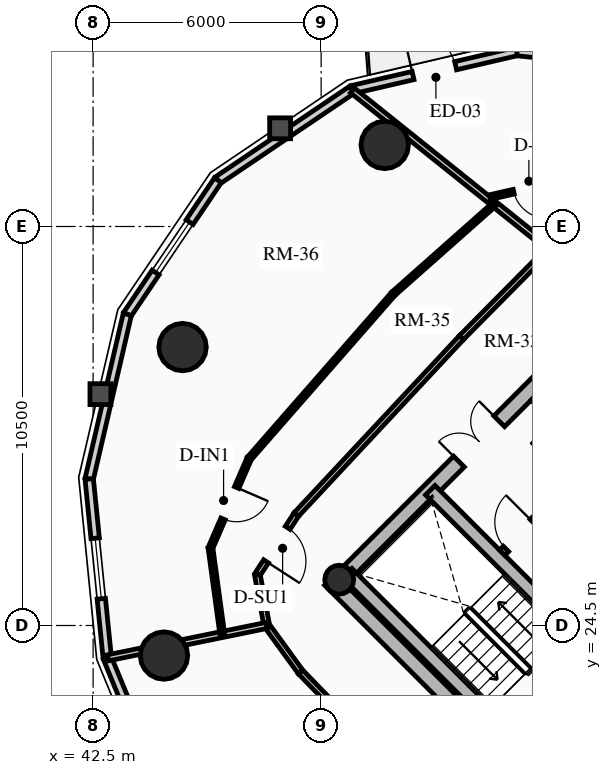
"""IFC4 building model, lengths in metres.
Left out: names, types, materials, properties, quantities, classifications, styles, units other than length and angle.
Written with IfcOpenShell. Run it as: python <this file> out.ifc"""

import sys

from ifc_helpers import new_model, si_unit, direction, frame, frame_2d, origin, origin_2d, place, context, subcontext, project, spatial, rectangle, circle, hollow_circle, extrude, source, transform, mapped, element, fill, save


model = new_model("IFC4")
c1 = context("Model", 3, precision=1e-05, world=origin(), true_north=direction((0.0, 1.0)))
c2 = subcontext(c1, "Body", "Model", "MODEL_VIEW")
j1 = project(units=[si_unit("LENGTHUNIT", "METRE"), si_unit("PLANEANGLEUNIT", "RADIAN")], contexts=[c1])
p1 = place(None, origin())
s1 = spatial("IfcSite", under=j1, at=p1, CompositionType="ELEMENT")
p2 = place(p1, origin())
s2 = spatial("IfcBuilding", under=s1, at=p2, CompositionType="ELEMENT")
p3 = place(p2, frame((0.0, 0.0, 171.97)))
s3 = spatial("IfcBuildingStorey", under=s2, at=p3, CompositionType="ELEMENT", Elevation=171.97)
p4 = place(p3, frame((58.702, 15.732, 0.0), z_axis=(0.0, 0.0, 1.0), x_axis=(-0.707106781187, 0.707106781187, 0.0)))
e1 = element("IfcWall", 1, at=p4, inside=s3, PredefinedType="SHEAR", context=c2, shape_type="SweptSolid", body=[
    extrude(rectangle(XDim=14.1, YDim=0.4, at=frame_2d((7.05, 0.0))), origin(), (0.0, 0.0, 1.0), 2.91),
])
p5 = place(p3, frame((48.873, 25.561, 0.0), z_axis=(0.0, 0.0, 1.0), x_axis=(0.707106781187, 0.707106781187, 0.0)))
e2 = element("IfcWall", 2, at=p5, inside=s3, PredefinedType="SHEAR", context=c2, shape_type="SweptSolid", body=[
    extrude(rectangle(XDim=10.7, YDim=0.4, at=frame_2d((5.35, 0.0))), origin(), (0.0, 0.0, 1.0), 2.91),
])
m1 = source(origin(), c2, "Body", "SweptSolid", [
    extrude(rectangle(XDim=1.5, YDim=2.02, at=frame_2d((0.75, 1.01))), frame((0.0, 0.21, 0.0), z_axis=(0.0, -1.0, 0.0), x_axis=(1.0, 0.0, 0.0)), (0.0, 0.0, 1.0), 0.42),
])
p6 = place(p5, frame((4.6, 0.0, 0.0)))
e3 = element("IfcOpeningElement", 3, at=p6, cuts=e2, PredefinedType="OPENING", context=c2, shape_type="MappedRepresentation", body=[
    mapped(m1, transform((0.0, 0.0, 0.0), x_axis=(1.0, 0.0, 0.0), y_axis=(0.0, 1.0, 0.0), z_axis=(0.0, 0.0, 1.0), scale=1.0)),
])
p7 = place(p3, frame((61.06, 18.373, 0.0), z_axis=(0.0, 0.0, 1.0), x_axis=(-0.707106781187, 0.707106781187, 0.0)))
e4 = element("IfcWall", 4, at=p7, inside=s3, PredefinedType="SHEAR", context=c2, shape_type="SweptSolid", body=[
    extrude(rectangle(XDim=13.7, YDim=0.35, at=frame_2d((6.85, 0.0))), origin(), (0.0, 0.0, 1.0), 2.91),
])
m2 = source(origin(), c2, "Body", "SweptSolid", [
    extrude(rectangle(XDim=1.1, YDim=2.015, at=frame_2d((0.55, 1.007))), frame((0.0, 0.185, 0.0), z_axis=(0.0, -1.0, 0.0), x_axis=(1.0, 0.0, 0.0)), (0.0, 0.0, 1.0), 0.37),
])
p8 = place(p7, frame((4.85, 0.0, 0.0)))
e5 = element("IfcOpeningElement", 5, at=p8, cuts=e4, PredefinedType="OPENING", context=c2, shape_type="MappedRepresentation", body=[
    mapped(m2, transform((0.0, 0.0, 0.0), x_axis=(1.0, 0.0, 0.0), y_axis=(0.0, 1.0, 0.0), z_axis=(0.0, 0.0, 1.0), scale=1.0)),
])
p9 = place(p7, frame((0.625, 0.0, 0.0)))
e6 = element("IfcOpeningElement", 6, at=p9, cuts=e4, PredefinedType="OPENING", context=c2, shape_type="MappedRepresentation", body=[
    mapped(m2, transform((0.0, 0.0, 0.0), x_axis=(1.0, 0.0, 0.0), y_axis=(0.0, 1.0, 0.0), z_axis=(0.0, 0.0, 1.0), scale=1.0)),
])
p10 = place(p7, frame((2.625, 0.0, 0.0)))
e7 = element("IfcOpeningElement", 7, at=p10, cuts=e4, PredefinedType="OPENING", context=c2, shape_type="MappedRepresentation", body=[
    mapped(m2, transform((0.0, 0.0, 0.0), x_axis=(1.0, 0.0, 0.0), y_axis=(0.0, 1.0, 0.0), z_axis=(0.0, 0.0, 1.0), scale=1.0)),
])
m3 = source(origin(), c2, "Body", "SweptSolid", [
    extrude(rectangle(XDim=1.15, YDim=2.02, at=frame_2d((0.575, 1.01))), frame((0.0, 0.185, 0.0), z_axis=(0.0, -1.0, 0.0), x_axis=(1.0, 0.0, 0.0)), (0.0, 0.0, 1.0), 0.37),
])
p11 = place(p7, frame((7.27, 0.0, 0.0)))
e8 = element("IfcOpeningElement", 8, at=p11, cuts=e4, PredefinedType="OPENING", context=c2, shape_type="MappedRepresentation", body=[
    mapped(m3, transform((0.0, 0.0, 0.0), x_axis=(1.0, 0.0, 0.0), y_axis=(0.0, 1.0, 0.0), z_axis=(0.0, 0.0, 1.0), scale=1.0)),
])
p12 = place(p3, frame((53.922, 21.141, 0.0), z_axis=(0.0, 0.0, 1.0), x_axis=(-0.707106781187, 0.707106781187, 0.0)))
e9 = element("IfcWall", 9, at=p12, inside=s3, PredefinedType="SHEAR", context=c2, shape_type="SweptSolid", body=[
    extrude(rectangle(XDim=6.695, YDim=0.35, at=frame_2d((3.348, 0.0))), origin(), (0.0, 0.0, 1.0), 2.91),
])
p13 = place(p3, frame((53.784, 21.003, 0.0), z_axis=(0.0, 0.0, 1.0), x_axis=(0.707106781187, 0.707106781187, 0.0)))
e10 = element("IfcWall", 10, at=p13, inside=s3, PredefinedType="SHEAR", context=c2, shape_type="SweptSolid", body=[
    extrude(rectangle(XDim=3.285, YDim=0.35, at=frame_2d((1.643, 0.0))), origin(), (0.0, 0.0, 1.0), 2.91),
])
p14 = place(p3, frame((48.976, 25.706, 0.0), z_axis=(0.0, 0.0, 1.0), x_axis=(0.707106781187, 0.707106781187, 0.0)))
e11 = element("IfcColumn", 11, at=p14, inside=s3, PredefinedType="COLUMN", context=c2, shape_type="SweptSolid", body=[
    extrude(hollow_circle(Radius=0.38, WallThickness=0.032, at=origin_2d()), origin(), (0.0, 0.0, 1.0), 2.91),
])
for number, where, z_axis, x_axis in (
    (12, (50.173, 37.146, 0.0), (0.0, 0.0, 1.0), (1.0, 0.0, 0.0)),
    (13, (44.854, 31.827, 0.0), (0.0, 0.0, 1.0), (1.0, 0.0, 0.0)),
    (14, (44.365, 23.709, 0.0), (0.0, 0.0, 1.0), (1.0, 0.0, 0.0)),
):
    element("IfcColumn", number, at=place(p3, frame(where, z_axis=z_axis, x_axis=x_axis)), inside=s3, PredefinedType="USERDEFINED", context=c2, shape_type="SweptSolid", body=[
        extrude(circle(Radius=0.625, at=origin_2d()), origin(), (0.0, 0.0, 1.0), 2.91),
    ])
p15 = place(p3, frame((53.645, 39.603, 0.0), z_axis=(0.0, 0.0, 1.0), x_axis=(0.994943283129, -0.100438356004, 0.0)))
e15 = element("IfcWall", 15, at=p15, inside=s3, PredefinedType="SOLIDWALL", context=c2, shape_type="SweptSolid", body=[
    extrude(rectangle(XDim=4.733, YDim=0.22, at=frame_2d((2.366, 0.0))), origin(), (0.0, 0.0, 1.0), 2.245),
])
m4 = source(origin(), c2, "Body", "SweptSolid", [
    extrude(rectangle(XDim=1.6, YDim=1.3, at=frame_2d((0.8, 0.65))), frame((0.0, 0.12, 0.0), z_axis=(0.0, -1.0, 0.0), x_axis=(1.0, 0.0, 0.0)), (0.0, 0.0, 1.0), 0.24),
])
p16 = place(p15, frame((1.566, 0.0, 0.65)))
e16 = element("IfcOpeningElement", 16, at=p16, cuts=e15, PredefinedType="OPENING", context=c2, shape_type="MappedRepresentation", body=[
    mapped(m4, transform((0.0, 0.0, 0.0), x_axis=(1.0, 0.0, 0.0), y_axis=(0.0, 1.0, 0.0), z_axis=(0.0, 0.0, 1.0), scale=1.0)),
])
p17 = place(p3, frame((49.313, 38.6, 0.0), z_axis=(0.0, 0.0, 1.0), x_axis=(0.97422620202, 0.22557328587, 0.0)))
e17 = element("IfcWall", 17, at=p17, inside=s3, PredefinedType="SOLIDWALL", context=c2, shape_type="SweptSolid", body=[
    extrude(rectangle(XDim=4.446, YDim=0.22, at=frame_2d((2.223, 0.0))), origin(), (0.0, 0.0, 1.0), 2.245),
])
m5 = source(origin(), c2, "Body", "SweptSolid", [
    extrude(rectangle(XDim=1.15, YDim=2.005, at=frame_2d((0.575, 1.002))), frame((0.0, 0.12, 0.0), z_axis=(0.0, -1.0, 0.0), x_axis=(1.0, 0.0, 0.0)), (0.0, 0.0, 1.0), 0.24),
])
p18 = place(p17, frame((1.648, 0.0, 0.0)))
e18 = element("IfcOpeningElement", 18, at=p18, cuts=e17, PredefinedType="OPENING", context=c2, shape_type="MappedRepresentation", body=[
    mapped(m5, transform((0.0, 0.0, 0.0), x_axis=(1.0, 0.0, 0.0), y_axis=(0.0, 1.0, 0.0), z_axis=(0.0, 0.0, 1.0), scale=1.0)),
])
p19 = place(p3, frame((45.783, 36.217, 0.0), z_axis=(0.0, 0.0, 1.0), x_axis=(0.828817439852, 0.55951912514, 0.0)))
e19 = element("IfcWall", 19, at=p19, inside=s3, PredefinedType="SOLIDWALL", context=c2, shape_type="SweptSolid", body=[
    extrude(rectangle(XDim=4.259, YDim=0.22, at=frame_2d((2.129, 0.0))), origin(), (0.0, 0.0, 1.0), 2.245),
])
p20 = place(p3, frame((43.4, 32.687, 0.0), z_axis=(0.0, 0.0, 1.0), x_axis=(0.55951912514, 0.828817439852, 0.0)))
e20 = element("IfcWall", 20, at=p20, inside=s3, PredefinedType="SOLIDWALL", context=c2, shape_type="SweptSolid", body=[
    extrude(rectangle(XDim=4.259, YDim=0.22, at=frame_2d((2.129, 0.0))), origin(), (0.0, 0.0, 1.0), 2.245),
])
p21 = place(p20, frame((1.33, 0.0, 0.65)))
e21 = element("IfcOpeningElement", 21, at=p21, cuts=e20, PredefinedType="OPENING", context=c2, shape_type="MappedRepresentation", body=[
    mapped(m4, transform((0.0, 0.0, 0.0), x_axis=(1.0, 0.0, 0.0), y_axis=(0.0, 1.0, 0.0), z_axis=(0.0, 0.0, 1.0), scale=1.0)),
])
p22 = place(p3, frame((42.397, 28.355, 0.0), z_axis=(0.0, 0.0, 1.0), x_axis=(0.22557328587, 0.97422620202, 0.0)))
e22 = element("IfcWall", 22, at=p22, inside=s3, PredefinedType="SOLIDWALL", context=c2, shape_type="SweptSolid", body=[
    extrude(rectangle(XDim=4.446, YDim=0.22, at=frame_2d((2.223, 0.0))), origin(), (0.0, 0.0, 1.0), 2.245),
])
p23 = place(p3, frame((42.873, 23.646, 0.0), z_axis=(0.0, 0.0, 1.0), x_axis=(-0.100438356004, 0.994943283129, 0.0)))
e23 = element("IfcWall", 23, at=p23, inside=s3, PredefinedType="SOLIDWALL", context=c2, shape_type="SweptSolid", body=[
    extrude(rectangle(XDim=4.733, YDim=0.22, at=frame_2d((2.366, 0.0))), origin(), (0.0, 0.0, 1.0), 2.245),
])
p24 = place(p23, frame((1.566, 0.0, 0.65)))
e24 = element("IfcOpeningElement", 24, at=p24, cuts=e23, PredefinedType="OPENING", context=c2, shape_type="MappedRepresentation", body=[
    mapped(m4, transform((0.0, 0.0, 0.0), x_axis=(1.0, 0.0, 0.0), y_axis=(0.0, 1.0, 0.0), z_axis=(0.0, 0.0, 1.0), scale=1.0)),
])
p25 = place(p3, frame((44.78, 19.021, 0.0), z_axis=(0.0, 0.0, 1.0), x_axis=(-0.381196434348, 0.924494066201, 0.0)))
e25 = element("IfcWall", 25, at=p25, inside=s3, PredefinedType="SOLIDWALL", context=c2, shape_type="SweptSolid", body=[
    extrude(rectangle(XDim=5.003, YDim=0.22, at=frame_2d((2.501, 0.0))), origin(), (0.0, 0.0, 1.0), 2.245),
])
p26 = place(p25, frame((1.702, 0.0, 0.65)))
e26 = element("IfcOpeningElement", 26, at=p26, cuts=e25, PredefinedType="OPENING", context=c2, shape_type="MappedRepresentation", body=[
    mapped(m4, transform((0.0, 0.0, 0.0), x_axis=(1.0, 0.0, 0.0), y_axis=(0.0, 1.0, 0.0), z_axis=(0.0, 0.0, 1.0), scale=1.0)),
])
p27 = place(p3, frame((53.264, 26.416, 0.0), z_axis=(0.0, 0.0, 1.0), x_axis=(0.707106781187, 0.707106781187, 0.0)))
e27 = element("IfcWall", 27, at=p27, inside=s3, PredefinedType="PARTITIONING", context=c2, shape_type="SweptSolid", body=[
    extrude(rectangle(XDim=3.28, YDim=0.2, at=frame_2d((1.64, 0.0))), origin(), (0.0, 0.0, 1.0), 2.675),
])
m6 = source(origin(), c2, "Body", "SweptSolid", [
    extrude(rectangle(XDim=1.0, YDim=2.015, at=frame_2d((0.5, 1.007))), frame((0.0, 0.11, 0.0), z_axis=(0.0, -1.0, 0.0), x_axis=(1.0, 0.0, 0.0)), (0.0, 0.0, 1.0), 0.22),
])
p28 = place(p27, frame((0.14, 0.0, 0.0)))
e28 = element("IfcOpeningElement", 28, at=p28, cuts=e27, PredefinedType="OPENING", context=c2, shape_type="MappedRepresentation", body=[
    mapped(m6, transform((0.0, 0.0, 0.0), x_axis=(1.0, 0.0, 0.0), y_axis=(0.0, 1.0, 0.0), z_axis=(0.0, 0.0, 1.0), scale=1.0)),
])
m7 = source(origin(), c2, "Body", "SweptSolid", [
    extrude(rectangle(XDim=0.9, YDim=2.005, at=frame_2d((0.45, 1.002))), frame((0.0, 0.11, 0.0), z_axis=(0.0, -1.0, 0.0), x_axis=(1.0, 0.0, 0.0)), (0.0, 0.0, 1.0), 0.22),
])
p29 = place(p27, frame((2.05, 0.0, 0.0)))
e29 = element("IfcOpeningElement", 29, at=p29, cuts=e27, PredefinedType="OPENING", context=c2, shape_type="MappedRepresentation", body=[
    mapped(m7, transform((0.0, 0.0, 0.0), x_axis=(1.0, 0.0, 0.0), y_axis=(0.0, 1.0, 0.0), z_axis=(0.0, 0.0, 1.0), scale=1.0)),
])
p30 = place(p3, frame((56.839, 27.728, 0.0), z_axis=(0.0, 0.0, 1.0), x_axis=(-0.707106781187, 0.707106781187, 0.0)))
e30 = element("IfcWall", 30, at=p30, inside=s3, PredefinedType="PARTITIONING", context=c2, shape_type="SweptSolid", body=[
    extrude(rectangle(XDim=3.9, YDim=0.16, at=frame_2d((1.95, 0.0))), origin(), (0.0, 0.0, 1.0), 2.675),
])
m8 = source(origin(), c2, "Body", "SweptSolid", [
    extrude(rectangle(XDim=0.9, YDim=2.005, at=frame_2d((0.45, 1.002))), frame((0.0, 0.09, 0.0), z_axis=(0.0, -1.0, 0.0), x_axis=(1.0, 0.0, 0.0)), (0.0, 0.0, 1.0), 0.18),
])
p31 = place(p30, frame((2.2, 0.0, 0.0)))
e31 = element("IfcOpeningElement", 31, at=p31, cuts=e30, PredefinedType="OPENING", context=c2, shape_type="MappedRepresentation", body=[
    mapped(m8, transform((0.0, 0.0, 0.0), x_axis=(1.0, 0.0, 0.0), y_axis=(0.0, 1.0, 0.0), z_axis=(0.0, 0.0, 1.0), scale=1.0)),
])
p32 = place(p3, frame((54.514, 34.422, 0.0), z_axis=(0.0, 0.0, 1.0), x_axis=(-0.703289573518, -0.710903492593, 0.0)))
e32 = element("IfcWall", 32, at=p32, inside=s3, PredefinedType="PARTITIONING", context=c2, shape_type="SweptSolid", body=[
    extrude(rectangle(XDim=3.303, YDim=0.15, at=frame_2d((1.651, 0.0))), origin(), (0.0, 0.0, 1.0), 2.245),
])
p33 = place(p3, frame((52.191, 32.074, 0.0), z_axis=(0.0, 0.0, 1.0), x_axis=(-0.682404362608, -0.730974887321, 0.0)))
e33 = element("IfcWall", 33, at=p33, inside=s3, PredefinedType="PARTITIONING", context=c2, shape_type="SweptSolid", body=[
    extrude(rectangle(XDim=6.364, YDim=0.15, at=frame_2d((3.182, 0.0))), origin(), (0.0, 0.0, 1.0), 2.245),
])
p34 = place(p3, frame((47.849, 27.423, 0.0), z_axis=(0.0, 0.0, 1.0), x_axis=(-0.543529808582, -0.839389866023, 0.0)))
e34 = element("IfcWall", 34, at=p34, inside=s3, PredefinedType="PARTITIONING", context=c2, shape_type="SweptSolid", body=[
    extrude(rectangle(XDim=1.89, YDim=0.15, at=frame_2d((0.945, 0.0))), origin(), (0.0, 0.0, 1.0), 2.245),
])
m9 = source(origin(), c2, "Body", "SweptSolid", [
    extrude(rectangle(XDim=1.05, YDim=2.015, at=frame_2d((0.525, 1.007))), frame((0.0, 0.085, 0.0), z_axis=(0.0, -1.0, 0.0), x_axis=(1.0, 0.0, 0.0)), (0.0, 0.0, 1.0), 0.17),
])
p35 = place(p34, frame((0.42, 0.0, 0.0)))
e35 = element("IfcOpeningElement", 35, at=p35, cuts=e34, PredefinedType="OPENING", context=c2, shape_type="MappedRepresentation", body=[
    mapped(m9, transform((0.0, 0.0, 0.0), x_axis=(1.0, 0.0, 0.0), y_axis=(0.0, 1.0, 0.0), z_axis=(0.0, 0.0, 1.0), scale=1.0)),
])
p36 = place(p3, frame((46.822, 25.836, 0.0), z_axis=(0.0, 0.0, 1.0), x_axis=(0.182115036249, -0.983277231289, 0.0)))
e36 = element("IfcWall", 36, at=p36, inside=s3, PredefinedType="PARTITIONING", context=c2, shape_type="SweptSolid", body=[
    extrude(rectangle(XDim=1.357, YDim=0.15, at=frame_2d((0.678, 0.0))), origin(), (0.0, 0.0, 1.0), 2.245),
])
p37 = place(p3, frame((47.069, 24.502, 0.0), z_axis=(0.0, 0.0, 1.0), x_axis=(0.587577436866, -0.809167940347, 0.0)))
e37 = element("IfcWall", 37, at=p37, inside=s3, PredefinedType="PARTITIONING", context=c2, shape_type="SweptSolid", body=[
    extrude(rectangle(XDim=1.515, YDim=0.15, at=frame_2d((0.757, 0.0))), origin(), (0.0, 0.0, 1.0), 2.245),
])
p38 = place(p3, frame((47.959, 23.277, 0.0), z_axis=(0.0, 0.0, 1.0), x_axis=(0.696422573496, -0.717631938479, 0.0)))
e38 = element("IfcWall", 38, at=p38, inside=s3, PredefinedType="PARTITIONING", context=c2, shape_type="SweptSolid", body=[
    extrude(rectangle(XDim=5.882, YDim=0.15, at=frame_2d((2.941, 0.0))), origin(), (0.0, 0.0, 1.0), 2.675),
])
m10 = source(origin(), c2, "Body", "SweptSolid", [
    extrude(rectangle(XDim=1.0, YDim=2.015, at=frame_2d((0.5, 1.007))), frame((0.0, 0.085, 0.0), z_axis=(0.0, -1.0, 0.0), x_axis=(1.0, 0.0, 0.0)), (0.0, 0.0, 1.0), 0.17),
])
p39 = place(p38, frame((2.441, 0.0, 0.0)))
e39 = element("IfcOpeningElement", 39, at=p39, cuts=e38, PredefinedType="OPENING", context=c2, shape_type="MappedRepresentation", body=[
    mapped(m10, transform((0.0, 0.0, 0.0), x_axis=(1.0, 0.0, 0.0), y_axis=(0.0, 1.0, 0.0), z_axis=(0.0, 0.0, 1.0), scale=1.0)),
])
p40 = place(p3, frame((54.514, 34.422, 0.0), z_axis=(0.0, 0.0, 1.0), x_axis=(-0.780385234796, 0.625299036712, 0.0)))
e40 = element("IfcWall", 40, at=p40, inside=s3, PredefinedType="PARTITIONING", context=c2, shape_type="SweptSolid", body=[
    extrude(rectangle(XDim=6.653, YDim=0.16, at=frame_2d((3.326, 0.0))), origin(), (0.0, 0.0, 1.0), 2.245),
])
p41 = place(p3, frame((47.069, 24.502, 0.0), z_axis=(0.0, 0.0, 1.0), x_axis=(-0.979772902724, -0.200112616012, 0.0)))
e41 = element("IfcWall", 41, at=p41, inside=s3, PredefinedType="PARTITIONING", context=c2, shape_type="SweptSolid", body=[
    extrude(rectangle(XDim=4.263, YDim=0.16, at=frame_2d((2.131, 0.0))), origin(), (0.0, 0.0, 1.0), 2.245),
])
p42 = place(p3, frame((54.871, 36.211, 0.0), z_axis=(0.0, 0.0, 1.0), x_axis=(-0.975212623293, -0.221269833846, 0.0)))
e42 = element("IfcWall", 42, at=p42, inside=s3, PredefinedType="PARTITIONING", context=c2, shape_type="SweptSolid", body=[
    extrude(rectangle(XDim=1.983, YDim=0.125, at=frame_2d((0.991, 0.0))), origin(), (0.0, 0.0, 1.0), 2.675),
])
m11 = source(origin(), c2, "Body", "SweptSolid", [
    extrude(rectangle(XDim=0.9, YDim=2.005, at=frame_2d((0.45, 1.002))), frame((0.0, 0.073, 0.0), z_axis=(0.0, -1.0, 0.0), x_axis=(1.0, 0.0, 0.0)), (0.0, 0.0, 1.0), 0.145),
])
p43 = place(p42, frame((0.436, 0.0, 0.0)))
e43 = element("IfcOpeningElement", 43, at=p43, cuts=e42, PredefinedType="OPENING", context=c2, shape_type="MappedRepresentation", body=[
    mapped(m11, transform((0.0, 0.0, 0.0), x_axis=(1.0, 0.0, 0.0), y_axis=(0.0, 1.0, 0.0), z_axis=(0.0, 0.0, 1.0), scale=1.0)),
])
p44 = place(p3, frame((53.06, 35.587, 0.0), z_axis=(0.0, 0.0, 1.0), x_axis=(-0.748390346028, -0.663258539314, 0.0)))
e44 = element("IfcWall", 44, at=p44, inside=s3, PredefinedType="PARTITIONING", context=c2, shape_type="SweptSolid", body=[
    extrude(rectangle(XDim=3.553, YDim=0.125, at=frame_2d((1.777, 0.0))), origin(), (0.0, 0.0, 1.0), 2.245),
])
p45 = place(p3, frame((50.401, 33.23, 0.0), z_axis=(0.0, 0.0, 1.0), x_axis=(-0.658387591096, -0.752679068322, 0.0)))
e45 = element("IfcWall", 45, at=p45, inside=s3, PredefinedType="PARTITIONING", context=c2, shape_type="SweptSolid", body=[
    extrude(rectangle(XDim=5.761, YDim=0.125, at=frame_2d((2.88, 0.0))), origin(), (0.0, 0.0, 1.0), 2.245),
])
p46 = place(p3, frame((46.608, 28.894, 0.0), z_axis=(0.0, 0.0, 1.0), x_axis=(-0.397650183672, -0.917537100844, 0.0)))
e46 = element("IfcWall", 46, at=p46, inside=s3, PredefinedType="PARTITIONING", context=c2, shape_type="SweptSolid", body=[
    extrude(rectangle(XDim=2.564, YDim=0.125, at=frame_2d((1.282, 0.0))), origin(), (0.0, 0.0, 1.0), 2.245),
])
p47 = place(p46, frame((0.832, 0.0, 0.0)))
e47 = element("IfcOpeningElement", 47, at=p47, cuts=e46, PredefinedType="OPENING", context=c2, shape_type="MappedRepresentation", body=[
    mapped(m11, transform((0.0, 0.0, 0.0), x_axis=(1.0, 0.0, 0.0), y_axis=(0.0, 1.0, 0.0), z_axis=(0.0, 0.0, 1.0), scale=1.0)),
])
p48 = place(p3, frame((45.588, 26.541, 0.0), z_axis=(0.0, 0.0, 1.0), x_axis=(0.135321759641, -0.990801706381, 0.0)))
e48 = element("IfcWall", 48, at=p48, inside=s3, PredefinedType="PARTITIONING", context=c2, shape_type="SweptSolid", body=[
    extrude(rectangle(XDim=2.299, YDim=0.125, at=frame_2d((1.149, 0.0))), origin(), (0.0, 0.0, 1.0), 2.245),
])
m12 = source(origin(), c2, "Body", "SweptSolid", [
    extrude(rectangle(XDim=1.15, YDim=2.005, at=frame_2d((0.575, 1.002))), frame((0.0, 0.025, 0.0), z_axis=(0.0, -1.0, 0.0), x_axis=(1.0, 0.0, 0.0)), (0.0, 0.0, 1.0), 0.05),
])
p49 = place(p18, origin())
e49 = element("IfcDoor", 49, at=p49, inside=s3, OperationType="SINGLE_SWING_LEFT", PredefinedType="DOOR", context=c2, shape_type="MappedRepresentation", body=[
    mapped(m12, transform((0.0, 0.0, 0.0), x_axis=(1.0, 0.0, 0.0), y_axis=(0.0, 1.0, 0.0), z_axis=(0.0, 0.0, 1.0), scale=1.0)),
])
fill(e18, e49)
m13 = source(origin(), c2, "Body", "SweptSolid", [
    extrude(rectangle(XDim=1.6, YDim=1.3, at=frame_2d((0.8, 0.65))), frame((0.0, 0.03, 0.0), z_axis=(0.0, -1.0, 0.0), x_axis=(1.0, 0.0, 0.0)), (0.0, 0.0, 1.0), 0.06),
])
p50 = place(p21, origin())
e50 = element("IfcWindow", 50, at=p50, inside=s3, PartitioningType="SINGLE_PANEL", PredefinedType="WINDOW", context=c2, shape_type="MappedRepresentation", body=[
    mapped(m13, transform((0.0, 0.0, 0.0), x_axis=(1.0, 0.0, 0.0), y_axis=(0.0, 1.0, 0.0), z_axis=(0.0, 0.0, 1.0), scale=1.0)),
])
fill(e21, e50)
p51 = place(p24, origin())
e51 = element("IfcWindow", 51, at=p51, inside=s3, PartitioningType="SINGLE_PANEL", PredefinedType="WINDOW", context=c2, shape_type="MappedRepresentation", body=[
    mapped(m13, transform((0.0, 0.0, 0.0), x_axis=(1.0, 0.0, 0.0), y_axis=(0.0, 1.0, 0.0), z_axis=(0.0, 0.0, 1.0), scale=1.0)),
])
fill(e24, e51)
m14 = source(origin(), c2, "Body", "SweptSolid", [
    extrude(rectangle(XDim=1.5, YDim=2.02, at=frame_2d((0.75, 1.01))), frame((0.0, 0.025, 0.0), z_axis=(0.0, -1.0, 0.0), x_axis=(1.0, 0.0, 0.0)), (0.0, 0.0, 1.0), 0.05),
])
p52 = place(p6, origin())
e52 = element("IfcDoor", 52, at=p52, inside=s3, OperationType="DOUBLE_DOOR_SINGLE_SWING", PredefinedType="DOOR", context=c2, shape_type="MappedRepresentation", body=[
    mapped(m14, transform((0.0, 0.0, 0.0), x_axis=(1.0, 0.0, 0.0), y_axis=(0.0, 1.0, 0.0), z_axis=(0.0, 0.0, 1.0), scale=1.0)),
])
fill(e3, e52)
m15 = source(origin(), c2, "Body", "SweptSolid", [
    extrude(rectangle(XDim=1.0, YDim=2.015, at=frame_2d((0.5, 1.007))), frame((0.0, 0.025, 0.0), z_axis=(0.0, -1.0, 0.0), x_axis=(1.0, 0.0, 0.0)), (0.0, 0.0, 1.0), 0.05),
])
p53 = place(p28, origin())
e53 = element("IfcDoor", 53, at=p53, inside=s3, OperationType="SINGLE_SWING_RIGHT", PredefinedType="DOOR", context=c2, shape_type="MappedRepresentation", body=[
    mapped(m15, transform((0.0, 0.0, 0.0), x_axis=(1.0, 0.0, 0.0), y_axis=(0.0, 1.0, 0.0), z_axis=(0.0, 0.0, 1.0), scale=1.0)),
])
fill(e28, e53)
m16 = source(origin(), c2, "Body", "SweptSolid", [
    extrude(rectangle(XDim=0.9, YDim=2.005, at=frame_2d((0.45, 1.002))), frame((0.0, 0.025, 0.0), z_axis=(0.0, -1.0, 0.0), x_axis=(1.0, 0.0, 0.0)), (0.0, 0.0, 1.0), 0.05),
])
p54 = place(p43, origin())
e54 = element("IfcDoor", 54, at=p54, inside=s3, OperationType="SINGLE_SWING_LEFT", PredefinedType="DOOR", context=c2, shape_type="MappedRepresentation", body=[
    mapped(m16, transform((0.0, 0.0, 0.0), x_axis=(1.0, 0.0, 0.0), y_axis=(0.0, 1.0, 0.0), z_axis=(0.0, 0.0, 1.0), scale=1.0)),
])
fill(e43, e54)
m17 = source(origin(), c2, "Body", "SweptSolid", [
    extrude(rectangle(XDim=1.05, YDim=2.015, at=frame_2d((0.525, 1.007))), frame((0.0, 0.025, 0.0), z_axis=(0.0, -1.0, 0.0), x_axis=(1.0, 0.0, 0.0)), (0.0, 0.0, 1.0), 0.05),
])
p55 = place(p35, origin())
e55 = element("IfcDoor", 55, at=p55, inside=s3, OperationType="SINGLE_SWING_RIGHT", PredefinedType="DOOR", context=c2, shape_type="MappedRepresentation", body=[
    mapped(m17, transform((0.0, 0.0, 0.0), x_axis=(1.0, 0.0, 0.0), y_axis=(0.0, 1.0, 0.0), z_axis=(0.0, 0.0, 1.0), scale=1.0)),
])
fill(e35, e55)
p56 = place(p47, origin())
e56 = element("IfcDoor", 56, at=p56, inside=s3, OperationType="SINGLE_SWING_LEFT", PredefinedType="DOOR", context=c2, shape_type="MappedRepresentation", body=[
    mapped(m16, transform((0.0, 0.0, 0.0), x_axis=(1.0, 0.0, 0.0), y_axis=(0.0, 1.0, 0.0), z_axis=(0.0, 0.0, 1.0), scale=1.0)),
])
fill(e47, e56)
save(model, sys.argv[1])
